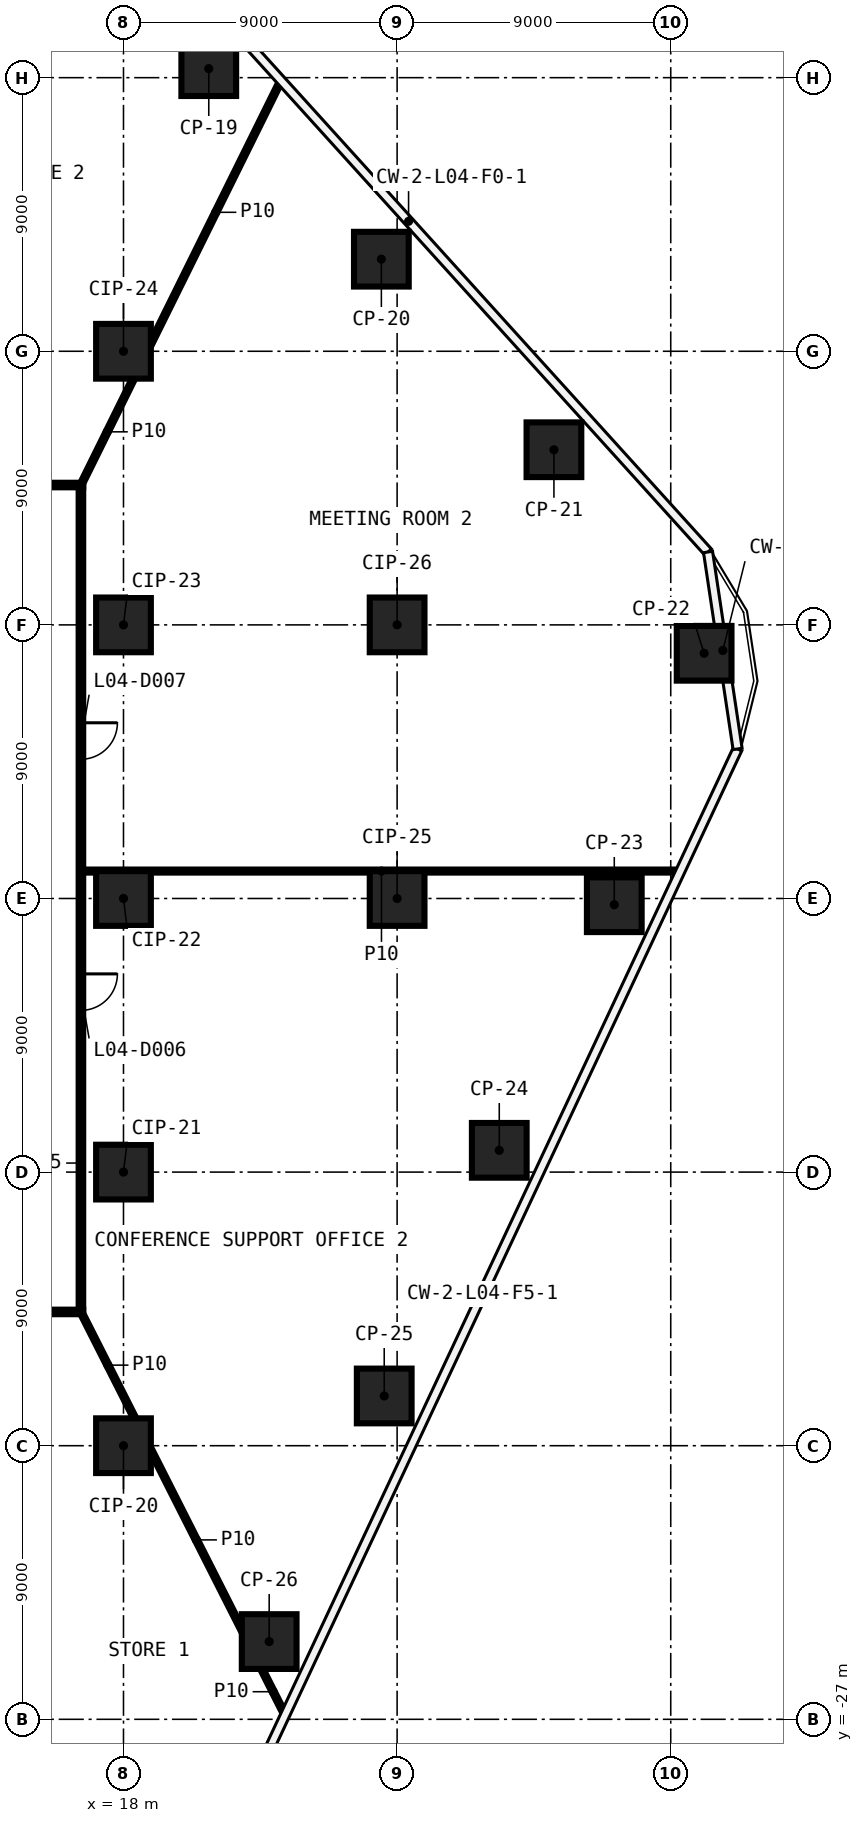
"""IFC4 building model, lengths in metres.
Left out: names, types, materials, properties, quantities, classifications, styles, units other than length and angle.
Written with IfcOpenShell. Run it as: python <this file> out.ifc"""

import sys

from ifc_helpers import new_model, si_unit, direction, frame, frame_2d, origin, origin_2d, place, context, subcontext, project, spatial, rectangle, extrude, element, fill, save


model = new_model("IFC4")
c1 = context("Model", 3, precision=1e-05, world=origin(), true_north=direction((0.0, 1.0)))
c2 = subcontext(c1, "Body", "Model", "MODEL_VIEW")
j1 = project(units=[si_unit("LENGTHUNIT", "METRE"), si_unit("PLANEANGLEUNIT", "RADIAN")], contexts=[c1])
p1 = place(None, origin())
s1 = spatial("IfcSite", under=j1, at=p1, CompositionType="ELEMENT")
p2 = place(p1, origin())
s2 = spatial("IfcBuilding", under=s1, at=p2, CompositionType="ELEMENT")
p3 = place(p2, frame((0.0, 0.0, 33.0)))
s3 = spatial("IfcBuildingStorey", under=s2, at=p3, CompositionType="ELEMENT", Elevation=33.0)
for number, where, z_axis, x_axis in (
    (1, (20.805, 27.297, 0.0), (0.0, 0.0, 1.0), (1.0, 0.0, 0.0)),
    (2, (26.482, 21.029, 0.0), (0.0, 0.0, 1.0), (1.0, 0.0, 0.0)),
    (3, (32.158, 14.761, 0.0), (0.0, 0.0, 1.0), (1.0, 0.0, 0.0)),
    (4, (37.098, 8.066, 0.0), (0.0, 0.0, 1.0), (1.0, 0.0, 0.0)),
    (5, (34.143, -0.205, 0.0), (0.0, 0.0, 1.0), (1.0, 0.0, 0.0)),
    (6, (30.36, -8.284, 0.0), (0.0, 0.0, 1.0), (1.0, 0.0, 0.0)),
    (7, (26.576, -16.364, 0.0), (0.0, 0.0, 1.0), (1.0, 0.0, 0.0)),
    (8, (22.792, -24.443, 0.0), (0.0, 0.0, 1.0), (1.0, 0.0, 0.0)),
    (9, (18.0, -18.0, 0.0), (0.0, 0.0, 1.0), (1.0, 0.0, 0.0)),
    (10, (18.0, -9.0, 0.0), (0.0, 0.0, 1.0), (1.0, 0.0, 0.0)),
    (11, (18.0, 0.0, 0.0), (0.0, 0.0, 1.0), (1.0, 0.0, 0.0)),
    (12, (18.0, 9.0, 0.0), (0.0, 0.0, 1.0), (1.0, 0.0, 0.0)),
    (13, (18.0, 18.0, 0.0), (0.0, 0.0, 1.0), (1.0, 0.0, 0.0)),
    (14, (27.0, 0.0, 0.0), (0.0, 0.0, 1.0), (1.0, 0.0, 0.0)),
    (15, (27.0, 9.0, 0.0), (0.0, 0.0, 1.0), (1.0, 0.0, 0.0)),
):
    element("IfcColumn", number, at=place(p3, frame(where, z_axis=z_axis, x_axis=x_axis)), inside=s3, PredefinedType="COLUMN", context=c2, shape_type="SweptSolid", body=[
        extrude(rectangle(XDim=1.8, YDim=1.8, at=origin_2d()), origin(), (0.0, 0.0, 1.0), 4.6),
    ])
p4 = place(p3, frame((16.675, -13.6, 0.0), z_axis=(0.0, 0.0, 1.0), x_axis=(-1.0, 0.0, 0.0)))
e16 = element("IfcWall", 16, at=p4, inside=s3, PredefinedType="PARTITIONING", context=c2, shape_type="SweptSolid", body=[
    extrude(rectangle(XDim=33.35, YDim=0.15, at=frame_2d((16.675, 0.0))), origin(), (0.0, 0.0, 1.0), 4.6),
])
p5 = place(p4, frame((27.59, 0.0, 0.0)))
e17 = element("IfcOpeningElement", 17, at=p5, cuts=e16, PredefinedType="OPENING", context=c2, shape_type="SweptSolid", body=[
    extrude(rectangle(XDim=1.2, YDim=2.1, at=frame_2d((0.6, 1.05))), frame((0.0, 0.085, 0.0), z_axis=(0.0, -1.0, 0.0), x_axis=(1.0, 0.0, 0.0)), (0.0, 0.0, 1.0), 0.17),
])
p6 = place(p4, frame((9.633, 0.0, 0.0)))
e18 = element("IfcOpeningElement", 18, at=p6, cuts=e16, PredefinedType="OPENING", context=c2, shape_type="SweptSolid", body=[
    extrude(rectangle(XDim=1.2, YDim=2.1, at=frame_2d((0.6, 1.05))), frame((0.0, 0.085, 0.0), z_axis=(0.0, -1.0, 0.0), x_axis=(1.0, 0.0, 0.0)), (0.0, 0.0, 1.0), 0.17),
])
p7 = place(p4, frame((2.153, 0.0, 0.0)))
e19 = element("IfcOpeningElement", 19, at=p7, cuts=e16, PredefinedType="OPENING", context=c2, shape_type="SweptSolid", body=[
    extrude(rectangle(XDim=1.2, YDim=2.1, at=frame_2d((0.6, 1.05))), frame((0.0, 0.085, 0.0), z_axis=(0.0, -1.0, 0.0), x_axis=(1.0, 0.0, 0.0)), (0.0, 0.0, 1.0), 0.17),
])
p8 = place(p3, frame((16.675, 0.902, 0.0), z_axis=(0.0, 0.0, 1.0), x_axis=(1.0, 0.0, 0.0)))
e20 = element("IfcWall", 20, at=p8, inside=s3, PredefinedType="PARTITIONING", context=c2, shape_type="SweptSolid", body=[
    extrude(rectangle(XDim=19.621, YDim=0.1, at=frame_2d((9.811, 0.0))), origin(), (0.0, 0.0, 1.0), 4.6),
])
p9 = place(p3, frame((-16.675, 13.6, 0.0), z_axis=(0.0, 0.0, 1.0), x_axis=(1.0, 0.0, 0.0)))
e21 = element("IfcWall", 21, at=p9, inside=s3, PredefinedType="PARTITIONING", context=c2, shape_type="SweptSolid", body=[
    extrude(rectangle(XDim=33.35, YDim=0.15, at=frame_2d((16.675, 0.0))), origin(), (0.0, 0.0, 1.0), 4.6),
])
p10 = place(p9, frame((27.447, 0.0, 0.0)))
e22 = element("IfcOpeningElement", 22, at=p10, cuts=e21, PredefinedType="OPENING", context=c2, shape_type="SweptSolid", body=[
    extrude(rectangle(XDim=1.2, YDim=2.1, at=frame_2d((0.6, 1.05))), frame((0.0, 0.085, 0.0), z_axis=(0.0, -1.0, 0.0), x_axis=(1.0, 0.0, 0.0)), (0.0, 0.0, 1.0), 0.17),
])
p11 = place(p9, frame((19.346, 0.0, 0.0)))
e23 = element("IfcOpeningElement", 23, at=p11, cuts=e21, PredefinedType="OPENING", context=c2, shape_type="SweptSolid", body=[
    extrude(rectangle(XDim=1.2, YDim=2.1, at=frame_2d((0.6, 1.05))), frame((0.0, 0.085, 0.0), z_axis=(0.0, -1.0, 0.0), x_axis=(1.0, 0.0, 0.0)), (0.0, 0.0, 1.0), 0.17),
])
p12 = place(p3, frame((16.6, 13.6, 0.0), z_axis=(0.0, 0.0, 1.0), x_axis=(0.443207247844, 0.896419173969, 0.0)))
e24 = element("IfcWall", 24, at=p12, inside=s3, PredefinedType="PARTITIONING", context=c2, shape_type="SweptSolid", body=[
    extrude(rectangle(XDim=3.905, YDim=0.1, at=frame_2d((1.952, 0.0))), origin(), (0.0, 0.0, 1.0), 4.6),
])
p13 = place(p3, frame((18.9, 18.253, 0.0), z_axis=(0.0, 0.0, 1.0), x_axis=(0.443225904803, 0.89640994936, 0.0)))
e25 = element("IfcWall", 25, at=p13, inside=s3, PredefinedType="PARTITIONING", context=c2, shape_type="SweptSolid", body=[
    extrude(rectangle(XDim=9.635, YDim=0.1, at=frame_2d((4.817, 0.0))), origin(), (0.0, 0.0, 1.0), 4.6),
])
p14 = place(p3, frame((16.6, 13.525, 0.0), z_axis=(0.0, 0.0, 1.0), x_axis=(0.0, -1.0, 0.0)))
e26 = element("IfcWall", 26, at=p14, inside=s3, PredefinedType="PARTITIONING", context=c2, shape_type="SweptSolid", body=[
    extrude(rectangle(XDim=27.05, YDim=0.15, at=frame_2d((13.525, 0.0))), origin(), (0.0, 0.0, 1.0), 4.6),
])
p15 = place(p14, frame((16.006, 0.0, 0.0)))
e27 = element("IfcOpeningElement", 27, at=p15, cuts=e26, PredefinedType="OPENING", context=c2, shape_type="SweptSolid", body=[
    extrude(rectangle(XDim=1.2, YDim=2.1, at=frame_2d((0.6, 1.05))), frame((0.0, 0.085, 0.0), z_axis=(0.0, -1.0, 0.0), x_axis=(1.0, 0.0, 0.0)), (0.0, 0.0, 1.0), 0.17),
])
p16 = place(p14, frame((7.745, 0.0, 0.0)))
e28 = element("IfcOpeningElement", 28, at=p16, cuts=e26, PredefinedType="OPENING", context=c2, shape_type="SweptSolid", body=[
    extrude(rectangle(XDim=1.2, YDim=2.1, at=frame_2d((0.6, 1.05))), frame((0.0, 0.085, 0.0), z_axis=(0.0, -1.0, 0.0), x_axis=(1.0, 0.0, 0.0)), (0.0, 0.0, 1.0), 0.17),
])
p17 = place(p3, frame((16.6, -13.6, 0.0), z_axis=(0.0, 0.0, 1.0), x_axis=(0.451663698234, -0.892188266958, 0.0)))
e29 = element("IfcWall", 29, at=p17, inside=s3, PredefinedType="PARTITIONING", context=c2, shape_type="SweptSolid", body=[
    extrude(rectangle(XDim=3.923, YDim=0.1, at=frame_2d((1.961, 0.0))), origin(), (0.0, 0.0, 1.0), 4.6),
])
p18 = place(p3, frame((18.9, -18.143, 0.0), z_axis=(0.0, 0.0, 1.0), x_axis=(0.451674644957, -0.892182725176, 0.0)))
e30 = element("IfcWall", 30, at=p18, inside=s3, PredefinedType="PARTITIONING", context=c2, shape_type="SweptSolid", body=[
    extrude(rectangle(XDim=6.625, YDim=0.1, at=frame_2d((3.312, 0.0))), origin(), (0.0, 0.0, 1.0), 4.6),
])
p19 = place(p3, frame((22.545, -25.343, 0.0), z_axis=(0.0, 0.0, 1.0), x_axis=(0.451627018025, -0.892206835095, 0.0)))
e31 = element("IfcWall", 31, at=p19, inside=s3, PredefinedType="PARTITIONING", context=c2, shape_type="SweptSolid", body=[
    extrude(rectangle(XDim=1.68, YDim=0.1, at=frame_2d((0.84, 0.0))), origin(), (0.0, 0.0, 1.0), 4.6),
])
p20 = place(p15, origin())
e32 = element("IfcDoor", 32, at=p20, inside=s3, OperationType="SINGLE_SWING_LEFT", PredefinedType="DOOR", context=c2, shape_type="SweptSolid", body=[
    extrude(rectangle(XDim=1.2, YDim=2.1, at=frame_2d((0.6, 1.05))), frame((0.0, 0.025, 0.0), z_axis=(0.0, -1.0, 0.0), x_axis=(1.0, 0.0, 0.0)), (0.0, 0.0, 1.0), 0.05),
])
fill(e27, e32)
p21 = place(p16, origin())
e33 = element("IfcDoor", 33, at=p21, inside=s3, OperationType="SINGLE_SWING_RIGHT", PredefinedType="DOOR", context=c2, shape_type="SweptSolid", body=[
    extrude(rectangle(XDim=1.2, YDim=2.1, at=frame_2d((0.6, 1.05))), frame((0.0, 0.025, 0.0), z_axis=(0.0, -1.0, 0.0), x_axis=(1.0, 0.0, 0.0)), (0.0, 0.0, 1.0), 0.05),
])
fill(e28, e33)
save(model, sys.argv[1])
